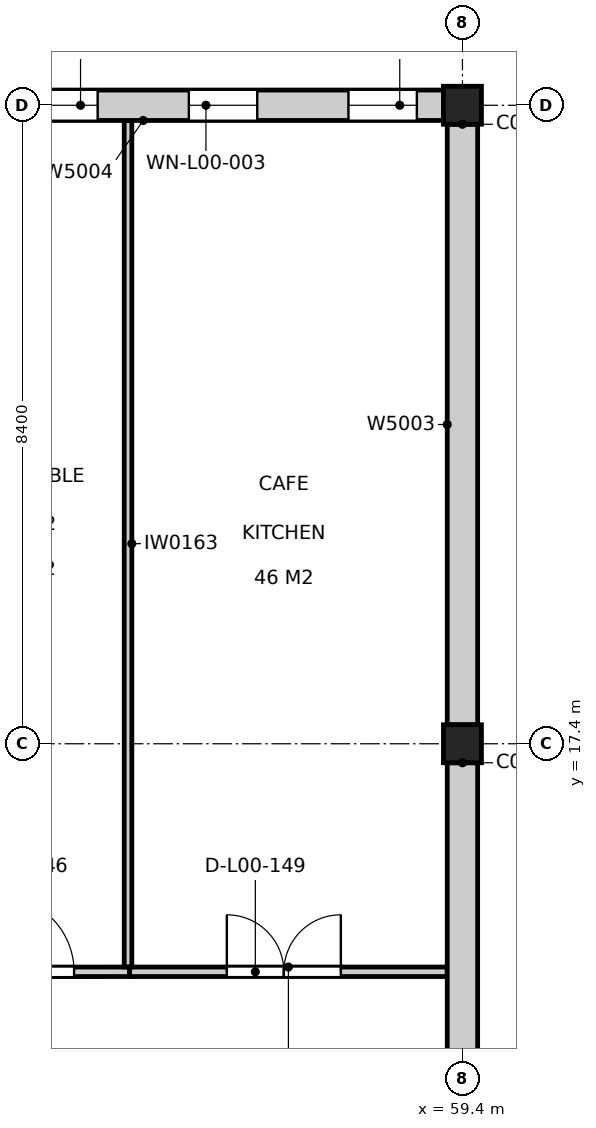
"""IFC4 building model, lengths in metres.
Left out: names, types, materials, properties, quantities, classifications, styles, units other than length and angle.
Written with IfcOpenShell. Run it as: python <this file> out.ifc"""

import sys

from ifc_helpers import new_model, si_unit, direction, frame, frame_2d, origin, origin_2d, place, context, subcontext, project, spatial, rectangle, extrude, element, fill, save


model = new_model("IFC4")
c1 = context("Model", 3, precision=1e-05, world=origin(), true_north=direction((0.0, 1.0)))
c2 = subcontext(c1, "Body", "Model", "MODEL_VIEW")
j1 = project(units=[si_unit("LENGTHUNIT", "METRE"), si_unit("PLANEANGLEUNIT", "RADIAN")], contexts=[c1])
p1 = place(None, origin())
s1 = spatial("IfcSite", under=j1, at=p1, CompositionType="ELEMENT")
p2 = place(p1, origin())
s2 = spatial("IfcBuilding", under=s1, at=p2, CompositionType="ELEMENT")
p3 = place(p2, origin())
s3 = spatial("IfcBuildingStorey", under=s2, at=p3, CompositionType="ELEMENT", Elevation=0.0)
for number, where, z_axis, x_axis in (
    (1, (59.4, 17.4, 0.0), (0.0, 0.0, 1.0), (1.0, 0.0, 0.0)),
    (2, (59.4, 25.8, 0.0), (0.0, 0.0, 1.0), (1.0, 0.0, 0.0)),
):
    element("IfcColumn", number, at=place(p3, frame(where, z_axis=z_axis, x_axis=x_axis)), inside=s3, PredefinedType="COLUMN", context=c2, shape_type="SweptSolid", body=[
        extrude(rectangle(XDim=0.5, YDim=0.5, at=origin_2d()), origin(), (0.0, 0.0, 1.0), 4.8),
    ])
p4 = place(p3, frame((52.62, 14.399, 0.0), z_axis=(0.0, 0.0, 1.0), x_axis=(0.999999917209, 0.000406917565, 0.0)))
e3 = element("IfcWall", 3, at=p4, inside=s3, PredefinedType="PARTITIONING", context=c2, shape_type="SweptSolid", body=[
    extrude(rectangle(XDim=2.4, YDim=0.125, at=frame_2d((1.2, 0.0))), origin(), (0.0, 0.0, 1.0), 4.04),
])
p5 = place(p4, frame((0.67, 0.0, 0.0)))
e4 = element("IfcOpeningElement", 4, at=p5, cuts=e3, PredefinedType="OPENING", context=c2, shape_type="SweptSolid", body=[
    extrude(rectangle(XDim=1.0, YDim=2.1, at=frame_2d((0.5, 1.05))), frame((0.0, 0.073, 0.0), z_axis=(0.0, -1.0, 0.0), x_axis=(1.0, 0.0, 0.0)), (0.0, 0.0, 1.0), 0.145),
])
p6 = place(p3, frame((55.02, 14.4, 0.0), z_axis=(0.0, 0.0, 1.0), x_axis=(1.0, 0.0, 0.0)))
e5 = element("IfcWall", 5, at=p6, inside=s3, PredefinedType="PARTITIONING", context=c2, shape_type="SweptSolid", body=[
    extrude(rectangle(XDim=4.18, YDim=0.125, at=frame_2d((2.09, 0.0))), origin(), (0.0, 0.0, 1.0), 4.04),
])
p7 = place(p6, frame((1.28, 0.0, 0.0)))
e6 = element("IfcOpeningElement", 6, at=p7, cuts=e5, PredefinedType="OPENING", context=c2, shape_type="SweptSolid", body=[
    extrude(rectangle(XDim=1.5, YDim=2.1, at=frame_2d((0.75, 1.05))), frame((0.0, 0.073, 0.0), z_axis=(0.0, -1.0, 0.0), x_axis=(1.0, 0.0, 0.0)), (0.0, 0.0, 1.0), 0.145),
])
p8 = place(p3, frame((55.0, 25.6, 0.0), z_axis=(0.0, 0.0, 1.0), x_axis=(0.0, -1.0, 0.0)))
e7 = element("IfcWall", 7, at=p8, inside=s3, PredefinedType="PARTITIONING", context=c2, shape_type="SweptSolid", body=[
    extrude(rectangle(XDim=11.135, YDim=0.1, at=frame_2d((5.567, 0.0))), origin(), (0.0, 0.0, 1.0), 3.84),
])
p9 = place(p3, frame((59.4, 9.25, 0.0), z_axis=(0.0, 0.0, 1.0), x_axis=(0.0, 1.0, 0.0)))
e8 = element("IfcWall", 8, at=p9, inside=s3, PredefinedType="SOLIDWALL", context=c2, shape_type="SweptSolid", body=[
    extrude(rectangle(XDim=7.9, YDim=0.4, at=frame_2d((3.95, 0.0))), origin(), (0.0, 0.0, 1.0), 3.84),
])
p10 = place(p3, frame((59.4, 17.65, 0.0), z_axis=(0.0, 0.0, 1.0), x_axis=(0.0, 1.0, 0.0)))
e9 = element("IfcWall", 9, at=p10, inside=s3, PredefinedType="SOLIDWALL", context=c2, shape_type="SweptSolid", body=[
    extrude(rectangle(XDim=7.9, YDim=0.4, at=frame_2d((3.95, 0.0))), origin(), (0.0, 0.0, 1.0), 3.84),
])
p11 = place(p3, frame((59.15, 25.8, 0.0), z_axis=(0.0, 0.0, 1.0), x_axis=(-1.0, 0.0, 0.0)))
e10 = element("IfcWall", 10, at=p11, inside=s3, PredefinedType="SOLIDWALL", context=c2, shape_type="SweptSolid", body=[
    extrude(rectangle(XDim=7.9, YDim=0.4, at=frame_2d((3.95, 0.0))), origin(), (0.0, 0.0, 1.0), 3.84),
])
p12 = place(p11, frame((6.7, 0.0, 1.8)))
e11 = element("IfcOpeningElement", 11, at=p12, cuts=e10, PredefinedType="OPENING", context=c2, shape_type="SweptSolid", body=[
    extrude(rectangle(XDim=0.9, YDim=0.6, at=frame_2d((0.45, 0.3))), frame((0.0, 0.21, 0.0), z_axis=(0.0, -1.0, 0.0), x_axis=(1.0, 0.0, 0.0)), (0.0, 0.0, 1.0), 0.42),
])
p13 = place(p11, frame((4.55, 0.0, 1.8)))
e12 = element("IfcOpeningElement", 12, at=p13, cuts=e10, PredefinedType="OPENING", context=c2, shape_type="SweptSolid", body=[
    extrude(rectangle(XDim=0.9, YDim=0.6, at=frame_2d((0.45, 0.3))), frame((0.0, 0.21, 0.0), z_axis=(0.0, -1.0, 0.0), x_axis=(1.0, 0.0, 0.0)), (0.0, 0.0, 1.0), 0.42),
])
p14 = place(p11, frame((2.45, 0.0, 1.2)))
e13 = element("IfcOpeningElement", 13, at=p14, cuts=e10, PredefinedType="OPENING", context=c2, shape_type="SweptSolid", body=[
    extrude(rectangle(XDim=0.9, YDim=1.5, at=frame_2d((0.45, 0.75))), frame((0.0, 0.21, 0.0), z_axis=(0.0, -1.0, 0.0), x_axis=(1.0, 0.0, 0.0)), (0.0, 0.0, 1.0), 0.42),
])
p15 = place(p11, frame((0.35, 0.0, 1.2)))
e14 = element("IfcOpeningElement", 14, at=p15, cuts=e10, PredefinedType="OPENING", context=c2, shape_type="SweptSolid", body=[
    extrude(rectangle(XDim=0.9, YDim=1.5, at=frame_2d((0.45, 0.75))), frame((0.0, 0.21, 0.0), z_axis=(0.0, -1.0, 0.0), x_axis=(1.0, 0.0, 0.0)), (0.0, 0.0, 1.0), 0.42),
])
p16 = place(p5, origin())
e15 = element("IfcDoor", 15, at=p16, inside=s3, OperationType="SINGLE_SWING_LEFT", PredefinedType="DOOR", context=c2, shape_type="SweptSolid", body=[
    extrude(rectangle(XDim=1.0, YDim=2.1, at=frame_2d((0.5, 1.05))), frame((0.0, 0.025, 0.0), z_axis=(0.0, -1.0, 0.0), x_axis=(1.0, 0.0, 0.0)), (0.0, 0.0, 1.0), 0.05),
])
fill(e4, e15)
p17 = place(p7, origin())
e16 = element("IfcDoor", 16, at=p17, inside=s3, OperationType="DOUBLE_DOOR_SINGLE_SWING", PredefinedType="DOOR", context=c2, shape_type="SweptSolid", body=[
    extrude(rectangle(XDim=1.5, YDim=2.1, at=frame_2d((0.75, 1.05))), frame((0.0, 0.025, 0.0), z_axis=(0.0, -1.0, 0.0), x_axis=(1.0, 0.0, 0.0)), (0.0, 0.0, 1.0), 0.05),
])
fill(e6, e16)
p18 = place(p13, origin())
e17 = element("IfcWindow", 17, at=p18, inside=s3, PartitioningType="SINGLE_PANEL", PredefinedType="WINDOW", context=c2, shape_type="SweptSolid", body=[
    extrude(rectangle(XDim=0.9, YDim=0.6, at=frame_2d((0.45, 0.3))), frame((0.0, 0.06, 0.0), z_axis=(0.0, -1.0, 0.0), x_axis=(1.0, 0.0, 0.0)), (0.0, 0.0, 1.0), 0.06),
])
fill(e12, e17)
p19 = place(p14, origin())
e18 = element("IfcWindow", 18, at=p19, inside=s3, PartitioningType="SINGLE_PANEL", PredefinedType="WINDOW", context=c2, shape_type="SweptSolid", body=[
    extrude(rectangle(XDim=0.9, YDim=1.5, at=frame_2d((0.45, 0.75))), frame((0.0, -0.14, 0.0), z_axis=(0.0, -1.0, 0.0), x_axis=(1.0, 0.0, 0.0)), (0.0, 0.0, 1.0), 0.06),
])
fill(e13, e18)
p20 = place(p15, origin())
e19 = element("IfcWindow", 19, at=p20, inside=s3, PartitioningType="SINGLE_PANEL", PredefinedType="WINDOW", context=c2, shape_type="SweptSolid", body=[
    extrude(rectangle(XDim=0.9, YDim=1.5, at=frame_2d((0.45, 0.75))), frame((0.0, -0.14, 0.0), z_axis=(0.0, -1.0, 0.0), x_axis=(1.0, 0.0, 0.0)), (0.0, 0.0, 1.0), 0.06),
])
fill(e14, e19)
save(model, sys.argv[1])
